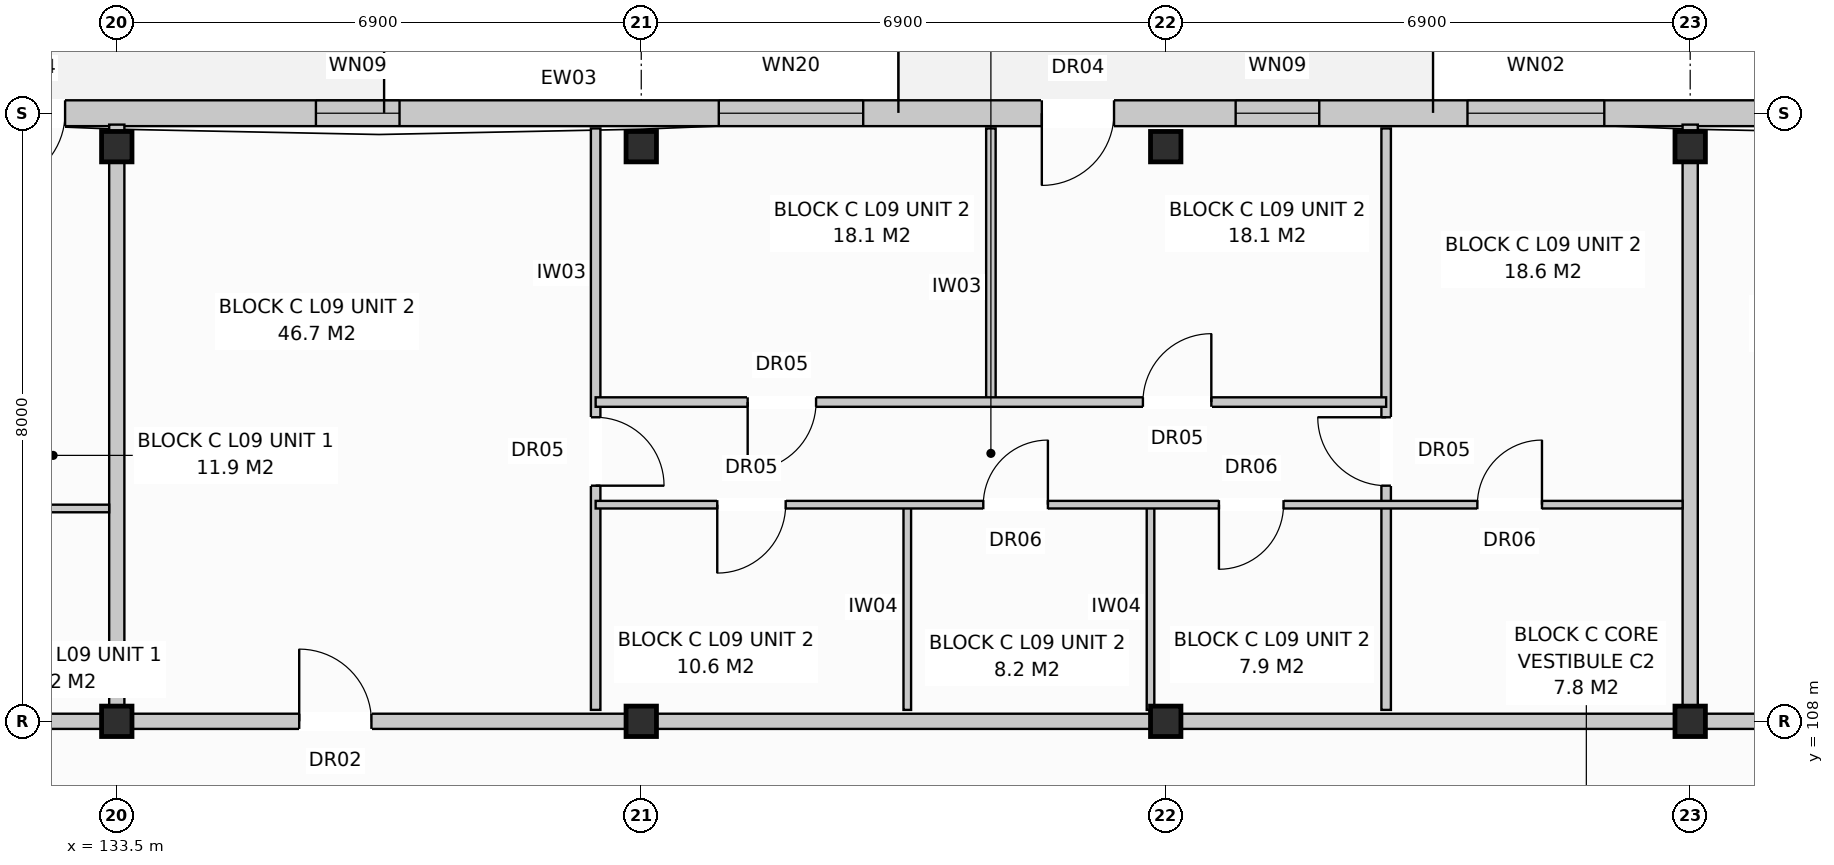
"""IFC4 building model, lengths in metres.
Left out: names, types, materials, properties, quantities, classifications, styles, units other than length and angle.
Written with IfcOpenShell. Run it as: python <this file> out.ifc"""

import sys

from ifc_helpers import new_model, si_unit, direction, frame, frame_2d, origin, origin_with_axes, origin_2d, place, context, subcontext, project, spatial, rectangle, extrude, element, fill, save


model = new_model("IFC4")
c1 = context("Model", 3, precision=1e-05, world=origin(), true_north=direction((0.0, 1.0)))
c2 = subcontext(c1, "Body", "Model", "MODEL_VIEW")
j1 = project(units=[si_unit("LENGTHUNIT", "METRE"), si_unit("PLANEANGLEUNIT", "RADIAN")], contexts=[c1])
p1 = place(None, origin())
s1 = spatial("IfcSite", under=j1, at=p1, CompositionType="ELEMENT")
p2 = place(p1, origin())
s2 = spatial("IfcBuilding", under=s1, at=p2, CompositionType="ELEMENT")
p3 = place(p2, frame((0.0, 0.0, 30.4)))
s3 = spatial("IfcBuildingStorey", under=s2, at=p3, CompositionType="ELEMENT", Elevation=30.4)
for number, where, z_axis, x_axis in (
    (1, (133.5, 108.0, 0.0), (0.0, 0.0, 1.0), (1.0, 0.0, 0.0)),
    (2, (133.5, 115.56, 0.0), (0.0, 0.0, 1.0), (1.0, 0.0, 0.0)),
    (3, (140.4, 108.0, 0.0), (0.0, 0.0, 1.0), (1.0, 0.0, 0.0)),
    (4, (140.4, 115.56, 0.0), (0.0, 0.0, 1.0), (1.0, 0.0, 0.0)),
    (5, (147.3, 108.0, 0.0), (0.0, 0.0, 1.0), (1.0, 0.0, 0.0)),
    (6, (147.3, 115.56, 0.0), (0.0, 0.0, 1.0), (1.0, 0.0, 0.0)),
    (7, (154.2, 108.0, 0.0), (0.0, 0.0, 1.0), (1.0, 0.0, 0.0)),
    (8, (154.2, 115.56, 0.0), (0.0, 0.0, 1.0), (1.0, 0.0, 0.0)),
):
    element("IfcColumn", number, at=place(p3, frame(where, z_axis=z_axis, x_axis=x_axis)), inside=s3, PredefinedType="COLUMN", context=c2, shape_type="SweptSolid", body=[
        extrude(rectangle(XDim=0.4, YDim=0.4, at=origin_2d()), origin(), (0.0, 0.0, 1.0), 3.2),
    ])
p4 = place(p3, frame((126.76, 116.0, 0.0), z_axis=(0.0, 0.0, 1.0), x_axis=(1.0, 0.0, 0.0)))
e9 = element("IfcWall", 9, at=p4, inside=s3, PredefinedType="STANDARD", context=c2, shape_type="SweptSolid", body=[
    extrude(rectangle(XDim=41.08, YDim=0.34, at=frame_2d((20.54, 0.0))), origin(), (0.0, 0.0, 1.0), 2.96),
])
p5 = place(p4, frame((5.11, 0.0, 0.0)))
e10 = element("IfcOpeningElement", 10, at=p5, cuts=e9, PredefinedType="OPENING", context=c2, shape_type="SweptSolid", body=[
    extrude(rectangle(XDim=0.95, YDim=2.1, at=frame_2d((0.475, 1.05))), frame((0.0, 0.182, 0.0), z_axis=(0.0, -1.0, 0.0), x_axis=(1.0, 0.0, 0.0)), (0.0, 0.0, 1.0), 0.364),
])
p6 = place(p4, frame((18.91, 0.0, 0.0)))
e11 = element("IfcOpeningElement", 11, at=p6, cuts=e9, PredefinedType="OPENING", context=c2, shape_type="SweptSolid", body=[
    extrude(rectangle(XDim=0.95, YDim=2.1, at=frame_2d((0.475, 1.05))), frame((0.0, 0.182, 0.0), z_axis=(0.0, -1.0, 0.0), x_axis=(1.0, 0.0, 0.0)), (0.0, 0.0, 1.0), 0.364),
])
p7 = place(p4, frame((31.443, 0.0, 0.0)))
e12 = element("IfcOpeningElement", 12, at=p7, cuts=e9, PredefinedType="OPENING", context=c2, shape_type="SweptSolid", body=[
    extrude(rectangle(XDim=0.95, YDim=2.1, at=frame_2d((0.475, 1.05))), frame((0.0, 0.182, 0.0), z_axis=(0.0, -1.0, 0.0), x_axis=(1.0, 0.0, 0.0)), (0.0, 0.0, 1.0), 0.364),
])
p8 = place(p4, frame((1.035, 0.0, 0.8)))
e13 = element("IfcOpeningElement", 13, at=p8, cuts=e9, PredefinedType="OPENING", context=c2, shape_type="SweptSolid", body=[
    extrude(rectangle(XDim=1.95, YDim=1.65, at=frame_2d((0.975, 0.825))), frame((0.0, 0.182, 0.0), z_axis=(0.0, -1.0, 0.0), x_axis=(1.0, 0.0, 0.0)), (0.0, 0.0, 1.0), 0.364),
])
p9 = place(p4, frame((9.36, 0.0, 0.72)))
e14 = element("IfcOpeningElement", 14, at=p9, cuts=e9, PredefinedType="OPENING", context=c2, shape_type="SweptSolid", body=[
    extrude(rectangle(XDim=1.1, YDim=1.5, at=frame_2d((0.55, 0.75))), frame((0.0, 0.182, 0.0), z_axis=(0.0, -1.0, 0.0), x_axis=(1.0, 0.0, 0.0)), (0.0, 0.0, 1.0), 0.364),
])
p10 = place(p4, frame((14.66, 0.0, 0.8)))
e15 = element("IfcOpeningElement", 15, at=p10, cuts=e9, PredefinedType="OPENING", context=c2, shape_type="SweptSolid", body=[
    extrude(rectangle(XDim=1.9, YDim=1.85, at=frame_2d((0.95, 0.925))), frame((0.0, 0.182, 0.0), z_axis=(0.0, -1.0, 0.0), x_axis=(1.0, 0.0, 0.0)), (0.0, 0.0, 1.0), 0.364),
])
p11 = place(p4, frame((21.46, 0.0, 0.72)))
e16 = element("IfcOpeningElement", 16, at=p11, cuts=e9, PredefinedType="OPENING", context=c2, shape_type="SweptSolid", body=[
    extrude(rectangle(XDim=1.1, YDim=1.5, at=frame_2d((0.55, 0.75))), frame((0.0, 0.182, 0.0), z_axis=(0.0, -1.0, 0.0), x_axis=(1.0, 0.0, 0.0)), (0.0, 0.0, 1.0), 0.364),
])
p12 = place(p4, frame((24.51, 0.0, 0.8)))
e17 = element("IfcOpeningElement", 17, at=p12, cuts=e9, PredefinedType="OPENING", context=c2, shape_type="SweptSolid", body=[
    extrude(rectangle(XDim=1.8, YDim=1.7, at=frame_2d((0.9, 0.85))), frame((0.0, 0.182, 0.0), z_axis=(0.0, -1.0, 0.0), x_axis=(1.0, 0.0, 0.0)), (0.0, 0.0, 1.0), 0.364),
])
p13 = place(p4, frame((29.16, 0.0, 0.8)))
e18 = element("IfcOpeningElement", 18, at=p13, cuts=e9, PredefinedType="OPENING", context=c2, shape_type="SweptSolid", body=[
    extrude(rectangle(XDim=1.9, YDim=1.85, at=frame_2d((0.95, 0.925))), frame((0.0, 0.182, 0.0), z_axis=(0.0, -1.0, 0.0), x_axis=(1.0, 0.0, 0.0)), (0.0, 0.0, 1.0), 0.364),
])
p14 = place(p4, frame((35.26, 0.0, 0.72)))
e19 = element("IfcOpeningElement", 19, at=p14, cuts=e9, PredefinedType="OPENING", context=c2, shape_type="SweptSolid", body=[
    extrude(rectangle(XDim=1.1, YDim=1.5, at=frame_2d((0.55, 0.75))), frame((0.0, 0.182, 0.0), z_axis=(0.0, -1.0, 0.0), x_axis=(1.0, 0.0, 0.0)), (0.0, 0.0, 1.0), 0.364),
])
p15 = place(p4, frame((38.11, 0.0, 0.8)))
e20 = element("IfcOpeningElement", 20, at=p15, cuts=e9, PredefinedType="OPENING", context=c2, shape_type="SweptSolid", body=[
    extrude(rectangle(XDim=1.8, YDim=1.7, at=frame_2d((0.9, 0.85))), frame((0.0, 0.182, 0.0), z_axis=(0.0, -1.0, 0.0), x_axis=(1.0, 0.0, 0.0)), (0.0, 0.0, 1.0), 0.364),
])
p16 = place(p3, frame((133.5, 108.15, 0.0), z_axis=(0.0, 0.0, 1.0), x_axis=(0.0, 1.0, 0.0)))
e21 = element("IfcWall", 21, at=p16, inside=s3, PredefinedType="PARTITIONING", context=c2, shape_type="SweptSolid", body=[
    extrude(rectangle(XDim=7.7, YDim=0.2, at=frame_2d((3.85, 0.0))), origin(), (0.0, 0.0, 1.0), 2.4),
])
p17 = place(p3, frame((126.6, 108.0, 0.0), z_axis=(0.0, 0.0, 1.0), x_axis=(1.0, 0.0, 0.0)))
e22 = element("IfcWall", 22, at=p17, inside=s3, PredefinedType="PARTITIONING", context=c2, shape_type="SweptSolid", body=[
    extrude(rectangle(XDim=6.9, YDim=0.2, at=frame_2d((3.45, 0.0))), origin(), (0.0, 0.0, 1.0), 2.4),
])
p18 = place(p17, frame((2.0, 0.0, 0.0)))
e23 = element("IfcOpeningElement", 23, at=p18, cuts=e22, PredefinedType="OPENING", context=c2, shape_type="SweptSolid", body=[
    extrude(rectangle(XDim=0.95, YDim=2.15, at=frame_2d((0.475, 1.075))), frame((0.0, 0.112, 0.0), z_axis=(0.0, -1.0, 0.0), x_axis=(1.0, 0.0, 0.0)), (0.0, 0.0, 1.0), 0.224),
])
p19 = place(p3, frame((130.9, 110.8, 0.0), z_axis=(0.0, 0.0, 1.0), x_axis=(1.0, 0.0, 0.0)))
e24 = element("IfcWall", 24, at=p19, inside=s3, PredefinedType="PARTITIONING", context=c2, shape_type="SweptSolid", body=[
    extrude(rectangle(XDim=2.5, YDim=0.1, at=frame_2d((1.25, 0.0))), origin(), (0.0, 0.0, 1.0), 2.96),
])
p20 = place(p3, frame((154.2, 108.15, 0.0), z_axis=(0.0, 0.0, 1.0), x_axis=(0.0, 1.0, 0.0)))
e25 = element("IfcWall", 25, at=p20, inside=s3, PredefinedType="PARTITIONING", context=c2, shape_type="SweptSolid", body=[
    extrude(rectangle(XDim=7.7, YDim=0.2, at=frame_2d((3.85, 0.0))), origin(), (0.0, 0.0, 1.0), 2.96),
])
p21 = place(p3, frame((133.5, 108.0, 0.0), z_axis=(0.0, 0.0, 1.0), x_axis=(1.0, 0.0, 0.0)))
e26 = element("IfcWall", 26, at=p21, inside=s3, PredefinedType="PARTITIONING", context=c2, shape_type="SweptSolid", body=[
    extrude(rectangle(XDim=20.7, YDim=0.2, at=frame_2d((10.35, 0.0))), origin(), (0.0, 0.0, 1.0), 2.4),
])
p22 = place(p21, frame((2.4, 0.0, 0.0)))
e27 = element("IfcOpeningElement", 27, at=p22, cuts=e26, PredefinedType="OPENING", context=c2, shape_type="SweptSolid", body=[
    extrude(rectangle(XDim=0.95, YDim=2.15, at=frame_2d((0.475, 1.075))), frame((0.0, 0.112, 0.0), z_axis=(0.0, -1.0, 0.0), x_axis=(1.0, 0.0, 0.0)), (0.0, 0.0, 1.0), 0.224),
])
p23 = place(p3, frame((139.8, 108.15, 0.0), z_axis=(0.0, 0.0, 1.0), x_axis=(0.0, 1.0, 0.0)))
e28 = element("IfcWall", 28, at=p23, inside=s3, PredefinedType="PARTITIONING", context=c2, shape_type="SweptSolid", body=[
    extrude(rectangle(XDim=7.65, YDim=0.125, at=frame_2d((3.825, 0.0))), origin(), (0.0, 0.0, 1.0), 2.96),
])
p24 = place(p23, frame((2.95, 0.0, 0.0)))
e29 = element("IfcOpeningElement", 29, at=p24, cuts=e28, PredefinedType="OPENING", context=c2, shape_type="SweptSolid", body=[
    extrude(rectangle(XDim=0.9, YDim=2.1, at=frame_2d((0.45, 1.05))), frame((0.0, 0.074, 0.0), z_axis=(0.0, -1.0, 0.0), x_axis=(1.0, 0.0, 0.0)), (0.0, 0.0, 1.0), 0.149),
])
for number, where, z_axis, x_axis in (
    (30, (143.9, 108.15, 0.0), (0.0, 0.0, 1.0), (0.0, 1.0, 0.0)),
    (31, (147.1, 108.15, 0.0), (0.0, 0.0, 1.0), (0.0, 1.0, 0.0)),
):
    element("IfcWall", number, at=place(p3, frame(where, z_axis=z_axis, x_axis=x_axis)), inside=s3, PredefinedType="PARTITIONING", context=c2, shape_type="SweptSolid", body=[
        extrude(rectangle(XDim=2.7, YDim=0.1, at=frame_2d((1.35, 0.0))), origin(), (0.0, 0.0, 1.0), 2.96),
    ])
p25 = place(p3, frame((145.0, 112.2, 0.0), z_axis=(0.0, 0.0, 1.0), x_axis=(0.0, 1.0, 0.0)))
e32 = element("IfcWall", 32, at=p25, inside=s3, PredefinedType="PARTITIONING", context=c2, shape_type="SweptSolid", body=[
    extrude(rectangle(XDim=3.6, YDim=0.125, at=frame_2d((1.8, 0.0))), origin(), (0.0, 0.0, 1.0), 2.59),
])
p26 = place(p3, frame((150.2, 108.15, 0.0), z_axis=(0.0, 0.0, 1.0), x_axis=(0.0, 1.0, 0.0)))
e33 = element("IfcWall", 33, at=p26, inside=s3, PredefinedType="PARTITIONING", context=c2, shape_type="SweptSolid", body=[
    extrude(rectangle(XDim=7.65, YDim=0.125, at=frame_2d((3.825, 0.0))), origin(), (0.0, 0.0, 1.0), 2.96),
])
p27 = place(p26, frame((2.95, 0.0, 0.0)))
e34 = element("IfcOpeningElement", 34, at=p27, cuts=e33, PredefinedType="OPENING", context=c2, shape_type="SweptSolid", body=[
    extrude(rectangle(XDim=0.9, YDim=2.1, at=frame_2d((0.45, 1.05))), frame((0.0, 0.074, 0.0), z_axis=(0.0, -1.0, 0.0), x_axis=(1.0, 0.0, 0.0)), (0.0, 0.0, 1.0), 0.149),
])
p28 = place(p3, frame((139.8, 110.85, 0.0), z_axis=(0.0, 0.0, 1.0), x_axis=(1.0, 0.0, 0.0)))
e35 = element("IfcWall", 35, at=p28, inside=s3, PredefinedType="PARTITIONING", context=c2, shape_type="SweptSolid", body=[
    extrude(rectangle(XDim=14.3, YDim=0.1, at=frame_2d((7.15, 0.0))), origin(), (0.0, 0.0, 1.0), 2.96),
])
p29 = place(p28, frame((1.6, 0.0, 0.0)))
e36 = element("IfcOpeningElement", 36, at=p29, cuts=e35, PredefinedType="OPENING", context=c2, shape_type="SweptSolid", body=[
    extrude(rectangle(XDim=0.9, YDim=2.1, at=frame_2d((0.45, 1.05))), frame((0.0, 0.062, 0.0), z_axis=(0.0, -1.0, 0.0), x_axis=(1.0, 0.0, 0.0)), (0.0, 0.0, 1.0), 0.124),
])
p30 = place(p28, frame((5.1, 0.0, 0.0)))
e37 = element("IfcOpeningElement", 37, at=p30, cuts=e35, PredefinedType="OPENING", context=c2, shape_type="SweptSolid", body=[
    extrude(rectangle(XDim=0.85, YDim=2.05, at=frame_2d((0.425, 1.025))), frame((0.0, 0.062, 0.0), z_axis=(0.0, -1.0, 0.0), x_axis=(1.0, 0.0, 0.0)), (0.0, 0.0, 1.0), 0.124),
])
p31 = place(p28, frame((8.2, 0.0, 0.0)))
e38 = element("IfcOpeningElement", 38, at=p31, cuts=e35, PredefinedType="OPENING", context=c2, shape_type="SweptSolid", body=[
    extrude(rectangle(XDim=0.85, YDim=2.05, at=frame_2d((0.425, 1.025))), frame((0.0, 0.062, 0.0), z_axis=(0.0, -1.0, 0.0), x_axis=(1.0, 0.0, 0.0)), (0.0, 0.0, 1.0), 0.124),
])
p32 = place(p28, frame((11.6, 0.0, 0.0)))
e39 = element("IfcOpeningElement", 39, at=p32, cuts=e35, PredefinedType="OPENING", context=c2, shape_type="SweptSolid", body=[
    extrude(rectangle(XDim=0.85, YDim=2.05, at=frame_2d((0.425, 1.025))), frame((0.0, 0.062, 0.0), z_axis=(0.0, -1.0, 0.0), x_axis=(1.0, 0.0, 0.0)), (0.0, 0.0, 1.0), 0.124),
])
p33 = place(p3, frame((139.8, 112.2, 0.0), z_axis=(0.0, 0.0, 1.0), x_axis=(1.0, 0.0, 0.0)))
e40 = element("IfcWall", 40, at=p33, inside=s3, PredefinedType="PARTITIONING", context=c2, shape_type="SweptSolid", body=[
    extrude(rectangle(XDim=10.4, YDim=0.125, at=frame_2d((5.2, 0.0))), origin(), (0.0, 0.0, 1.0), 2.96),
])
p34 = place(p33, frame((2.0, 0.0, 0.0)))
e41 = element("IfcOpeningElement", 41, at=p34, cuts=e40, PredefinedType="OPENING", context=c2, shape_type="SweptSolid", body=[
    extrude(rectangle(XDim=0.9, YDim=2.1, at=frame_2d((0.45, 1.05))), frame((0.0, 0.074, 0.0), z_axis=(0.0, -1.0, 0.0), x_axis=(1.0, 0.0, 0.0)), (0.0, 0.0, 1.0), 0.149),
])
p35 = place(p33, frame((7.2, 0.0, 0.0)))
e42 = element("IfcOpeningElement", 42, at=p35, cuts=e40, PredefinedType="OPENING", context=c2, shape_type="SweptSolid", body=[
    extrude(rectangle(XDim=0.9, YDim=2.1, at=frame_2d((0.45, 1.05))), frame((0.0, 0.074, 0.0), z_axis=(0.0, -1.0, 0.0), x_axis=(1.0, 0.0, 0.0)), (0.0, 0.0, 1.0), 0.149),
])
p36 = place(p3, frame((154.2, 108.0, 0.0), z_axis=(0.0, 0.0, 1.0), x_axis=(1.0, 0.0, 0.0)))
e43 = element("IfcWall", 43, at=p36, inside=s3, PredefinedType="PARTITIONING", context=c2, shape_type="SweptSolid", body=[
    extrude(rectangle(XDim=13.8, YDim=0.2, at=frame_2d((6.9, 0.0))), origin(), (0.0, 0.0, 1.0), 2.4),
])
p37 = place(p36, frame((2.4, 0.0, 0.0)))
e44 = element("IfcOpeningElement", 44, at=p37, cuts=e43, PredefinedType="OPENING", context=c2, shape_type="SweptSolid", body=[
    extrude(rectangle(XDim=0.95, YDim=2.15, at=frame_2d((0.475, 1.075))), frame((0.0, 0.112, 0.0), z_axis=(0.0, -1.0, 0.0), x_axis=(1.0, 0.0, 0.0)), (0.0, 0.0, 1.0), 0.224),
])
p38 = place(p5, frame((0.95, 0.0, 0.0), z_axis=(0.0, 0.0, 1.0), x_axis=(-1.0, 0.0, 0.0)))
e45 = element("IfcDoor", 45, at=p38, inside=s3, OperationType="SINGLE_SWING_LEFT", PredefinedType="DOOR", context=c2, shape_type="SweptSolid", body=[
    extrude(rectangle(XDim=0.95, YDim=2.1, at=frame_2d((0.475, 1.05))), frame((0.0, 0.025, 0.0), z_axis=(0.0, -1.0, 0.0), x_axis=(1.0, 0.0, 0.0)), (0.0, 0.0, 1.0), 0.05),
])
fill(e10, e45)
p39 = place(p6, frame((0.95, 0.0, 0.0), z_axis=(0.0, 0.0, 1.0), x_axis=(-1.0, 0.0, 0.0)))
e46 = element("IfcDoor", 46, at=p39, inside=s3, OperationType="SINGLE_SWING_LEFT", PredefinedType="DOOR", context=c2, shape_type="SweptSolid", body=[
    extrude(rectangle(XDim=0.95, YDim=2.1, at=frame_2d((0.475, 1.05))), frame((0.0, 0.025, 0.0), z_axis=(0.0, -1.0, 0.0), x_axis=(1.0, 0.0, 0.0)), (0.0, 0.0, 1.0), 0.05),
])
fill(e11, e46)
p40 = place(p9, origin_with_axes())
e47 = element("IfcWindow", 47, at=p40, inside=s3, PartitioningType="SINGLE_PANEL", PredefinedType="WINDOW", context=c2, shape_type="SweptSolid", body=[
    extrude(rectangle(XDim=1.1, YDim=1.5, at=frame_2d((0.55, 0.75))), frame((0.0, 0.03, 0.0), z_axis=(0.0, -1.0, 0.0), x_axis=(1.0, 0.0, 0.0)), (0.0, 0.0, 1.0), 0.06),
])
fill(e14, e47)
p41 = place(p10, origin_with_axes())
e48 = element("IfcWindow", 48, at=p41, inside=s3, PartitioningType="SINGLE_PANEL", PredefinedType="WINDOW", context=c2, shape_type="SweptSolid", body=[
    extrude(rectangle(XDim=1.9, YDim=1.85, at=frame_2d((0.95, 0.925))), frame((0.0, 0.03, 0.0), z_axis=(0.0, -1.0, 0.0), x_axis=(1.0, 0.0, 0.0)), (0.0, 0.0, 1.0), 0.06),
])
fill(e15, e48)
p42 = place(p11, origin_with_axes())
e49 = element("IfcWindow", 49, at=p42, inside=s3, PartitioningType="SINGLE_PANEL", PredefinedType="WINDOW", context=c2, shape_type="SweptSolid", body=[
    extrude(rectangle(XDim=1.1, YDim=1.5, at=frame_2d((0.55, 0.75))), frame((0.0, 0.03, 0.0), z_axis=(0.0, -1.0, 0.0), x_axis=(1.0, 0.0, 0.0)), (0.0, 0.0, 1.0), 0.06),
])
fill(e16, e49)
p43 = place(p12, origin_with_axes())
e50 = element("IfcWindow", 50, at=p43, inside=s3, PartitioningType="SINGLE_PANEL", PredefinedType="WINDOW", context=c2, shape_type="SweptSolid", body=[
    extrude(rectangle(XDim=1.8, YDim=1.7, at=frame_2d((0.9, 0.85))), frame((0.0, 0.03, 0.0), z_axis=(0.0, -1.0, 0.0), x_axis=(1.0, 0.0, 0.0)), (0.0, 0.0, 1.0), 0.06),
])
fill(e17, e50)
p44 = place(p22, origin_with_axes())
e51 = element("IfcDoor", 51, at=p44, inside=s3, OperationType="SINGLE_SWING_LEFT", PredefinedType="DOOR", context=c2, shape_type="SweptSolid", body=[
    extrude(rectangle(XDim=0.95, YDim=2.15, at=frame_2d((0.475, 1.075))), frame((0.0, 0.025, 0.0), z_axis=(0.0, -1.0, 0.0), x_axis=(1.0, 0.0, 0.0)), (0.0, 0.0, 1.0), 0.05),
])
fill(e27, e51)
p45 = place(p24, frame((0.9, 0.0, 0.0), z_axis=(0.0, 0.0, 1.0), x_axis=(-1.0, 0.0, 0.0)))
e52 = element("IfcDoor", 52, at=p45, inside=s3, OperationType="SINGLE_SWING_LEFT", PredefinedType="DOOR", context=c2, shape_type="SweptSolid", body=[
    extrude(rectangle(XDim=0.9, YDim=2.1, at=frame_2d((0.45, 1.05))), frame((0.0, 0.025, 0.0), z_axis=(0.0, -1.0, 0.0), x_axis=(1.0, 0.0, 0.0)), (0.0, 0.0, 1.0), 0.05),
])
fill(e29, e52)
p46 = place(p27, origin_with_axes())
e53 = element("IfcDoor", 53, at=p46, inside=s3, OperationType="SINGLE_SWING_RIGHT", PredefinedType="DOOR", context=c2, shape_type="SweptSolid", body=[
    extrude(rectangle(XDim=0.9, YDim=2.1, at=frame_2d((0.45, 1.05))), frame((0.0, 0.025, 0.0), z_axis=(0.0, -1.0, 0.0), x_axis=(1.0, 0.0, 0.0)), (0.0, 0.0, 1.0), 0.05),
])
fill(e34, e53)
p47 = place(p29, frame((0.9, 0.0, 0.0), z_axis=(0.0, 0.0, 1.0), x_axis=(-1.0, 0.0, 0.0)))
e54 = element("IfcDoor", 54, at=p47, inside=s3, OperationType="SINGLE_SWING_LEFT", PredefinedType="DOOR", context=c2, shape_type="SweptSolid", body=[
    extrude(rectangle(XDim=0.9, YDim=2.1, at=frame_2d((0.45, 1.05))), frame((0.0, 0.025, 0.0), z_axis=(0.0, -1.0, 0.0), x_axis=(1.0, 0.0, 0.0)), (0.0, 0.0, 1.0), 0.05),
])
fill(e36, e54)
p48 = place(p30, origin_with_axes())
e55 = element("IfcDoor", 55, at=p48, inside=s3, OperationType="SINGLE_SWING_RIGHT", PredefinedType="DOOR", context=c2, shape_type="SweptSolid", body=[
    extrude(rectangle(XDim=0.85, YDim=2.05, at=frame_2d((0.425, 1.025))), frame((0.0, 0.025, 0.0), z_axis=(0.0, -1.0, 0.0), x_axis=(1.0, 0.0, 0.0)), (0.0, 0.0, 1.0), 0.05),
])
fill(e37, e55)
p49 = place(p31, frame((0.85, 0.0, 0.0), z_axis=(0.0, 0.0, 1.0), x_axis=(-1.0, 0.0, 0.0)))
e56 = element("IfcDoor", 56, at=p49, inside=s3, OperationType="SINGLE_SWING_LEFT", PredefinedType="DOOR", context=c2, shape_type="SweptSolid", body=[
    extrude(rectangle(XDim=0.85, YDim=2.05, at=frame_2d((0.425, 1.025))), frame((0.0, 0.025, 0.0), z_axis=(0.0, -1.0, 0.0), x_axis=(1.0, 0.0, 0.0)), (0.0, 0.0, 1.0), 0.05),
])
fill(e38, e56)
p50 = place(p32, origin_with_axes())
e57 = element("IfcDoor", 57, at=p50, inside=s3, OperationType="SINGLE_SWING_RIGHT", PredefinedType="DOOR", context=c2, shape_type="SweptSolid", body=[
    extrude(rectangle(XDim=0.85, YDim=2.05, at=frame_2d((0.425, 1.025))), frame((0.0, 0.025, 0.0), z_axis=(0.0, -1.0, 0.0), x_axis=(1.0, 0.0, 0.0)), (0.0, 0.0, 1.0), 0.05),
])
fill(e39, e57)
p51 = place(p34, frame((0.9, 0.0, 0.0), z_axis=(0.0, 0.0, 1.0), x_axis=(-1.0, 0.0, 0.0)))
e58 = element("IfcDoor", 58, at=p51, inside=s3, OperationType="SINGLE_SWING_LEFT", PredefinedType="DOOR", context=c2, shape_type="SweptSolid", body=[
    extrude(rectangle(XDim=0.9, YDim=2.1, at=frame_2d((0.45, 1.05))), frame((0.0, 0.025, 0.0), z_axis=(0.0, -1.0, 0.0), x_axis=(1.0, 0.0, 0.0)), (0.0, 0.0, 1.0), 0.05),
])
fill(e41, e58)
p52 = place(p35, origin_with_axes())
e59 = element("IfcDoor", 59, at=p52, inside=s3, OperationType="SINGLE_SWING_RIGHT", PredefinedType="DOOR", context=c2, shape_type="SweptSolid", body=[
    extrude(rectangle(XDim=0.9, YDim=2.1, at=frame_2d((0.45, 1.05))), frame((0.0, 0.025, 0.0), z_axis=(0.0, -1.0, 0.0), x_axis=(1.0, 0.0, 0.0)), (0.0, 0.0, 1.0), 0.05),
])
fill(e42, e59)
save(model, sys.argv[1])
